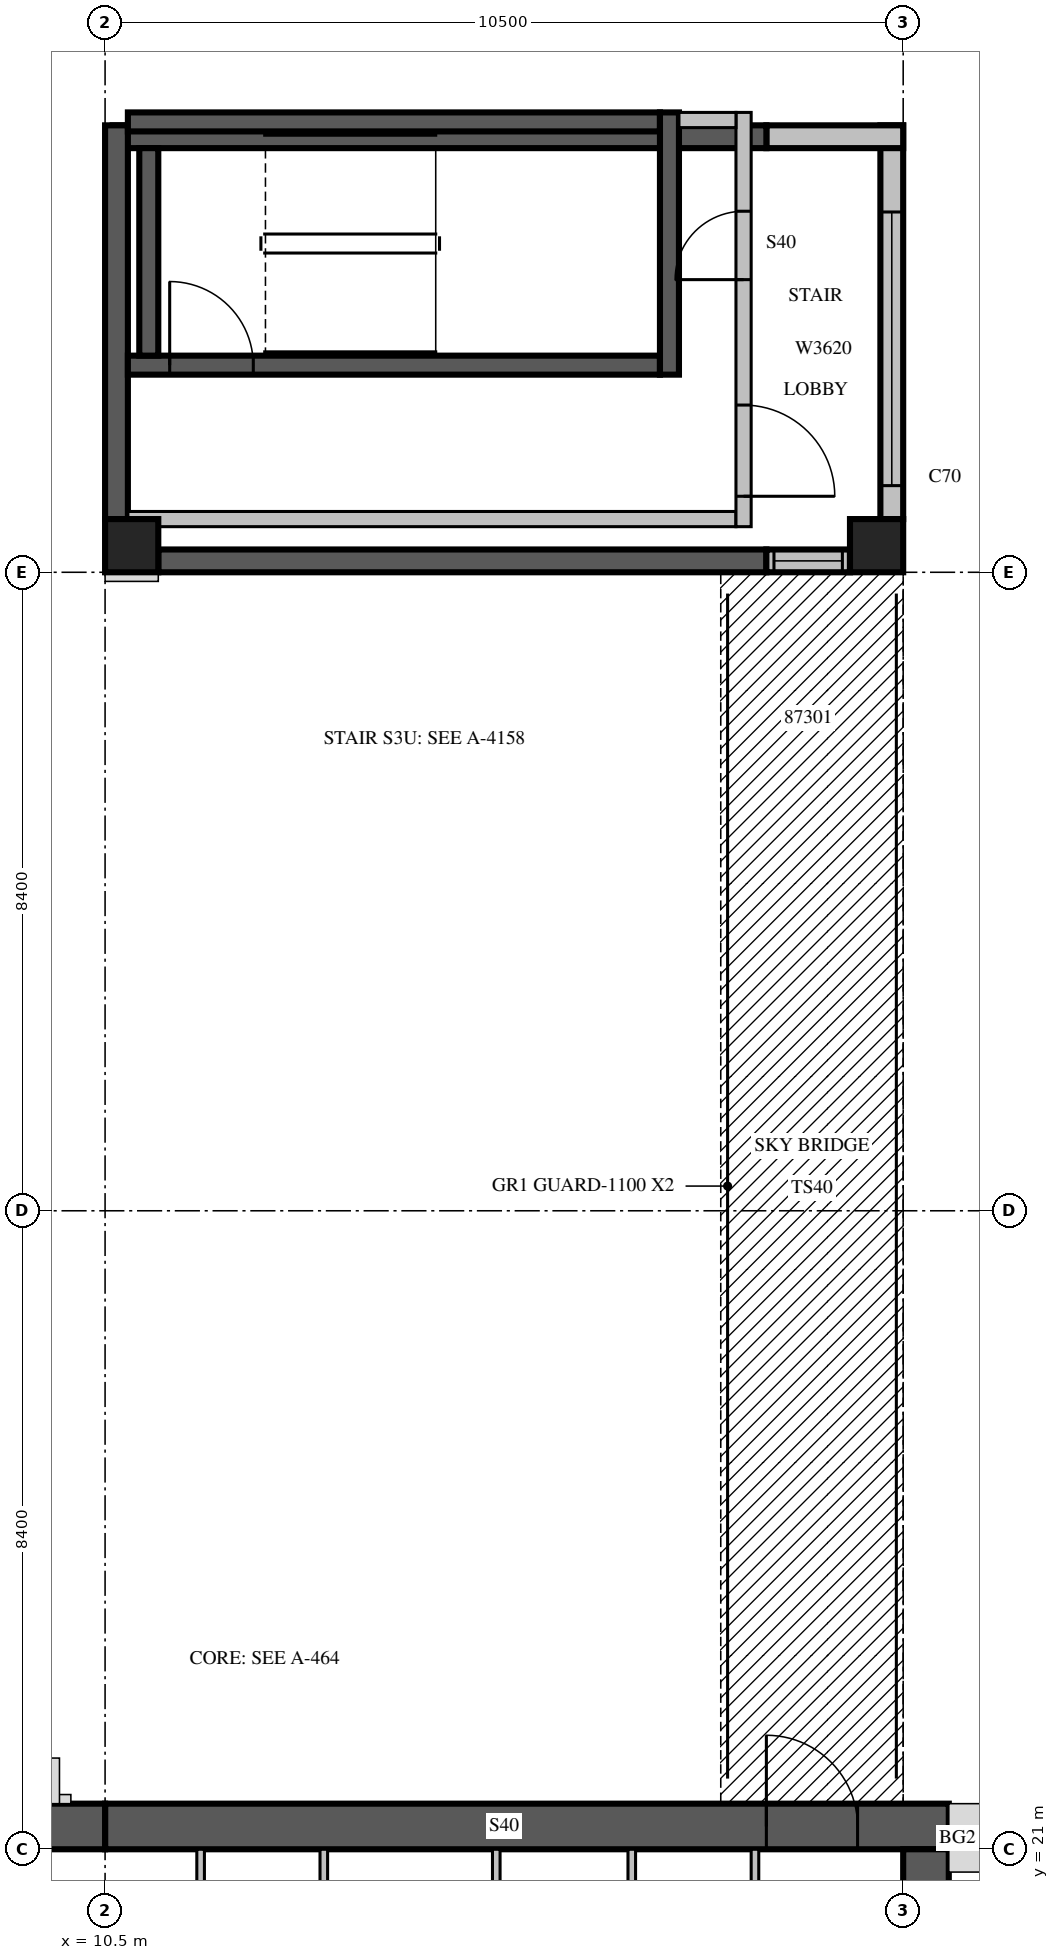
"""IFC4 building model, lengths in metres.
Left out: names, types, materials, properties, quantities, classifications, styles, units other than length and angle.
Written with IfcOpenShell. Run it as: python <this file> out.ifc"""

import sys

from ifc_helpers import new_model, si_unit, direction, frame, frame_2d, origin, origin_2d, place, context, subcontext, project, spatial, rectangle, extrude, source, transform, mapped, element, fill, save


model = new_model("IFC4")
c1 = context("Model", 3, precision=1e-05, world=origin(), true_north=direction((0.0, 1.0)))
c2 = subcontext(c1, "Body", "Model", "MODEL_VIEW")
j1 = project(units=[si_unit("LENGTHUNIT", "METRE"), si_unit("PLANEANGLEUNIT", "RADIAN")], contexts=[c1])
p1 = place(None, origin())
s1 = spatial("IfcSite", under=j1, at=p1, CompositionType="ELEMENT")
p2 = place(p1, origin())
s2 = spatial("IfcBuilding", under=s1, at=p2, CompositionType="ELEMENT")
p3 = place(p2, frame((0.0, 0.0, 316.0)))
s3 = spatial("IfcBuildingStorey", under=s2, at=p3, CompositionType="ELEMENT", Elevation=316.0)
m1 = source(origin(), c2, "Body", "SweptSolid", [
    extrude(rectangle(XDim=0.7, YDim=0.7, at=origin_2d()), origin(), (0.0, 0.0, 1.0), 3.5),
])
for number, where, z_axis, x_axis in (
    (1, (10.85, 38.15, 0.0), (0.0, 0.0, 1.0), (1.0, 0.0, 0.0)),
    (2, (20.65, 38.15, 0.0), (0.0, 0.0, 1.0), (1.0, 0.0, 0.0)),
):
    element("IfcColumn", number, at=place(p3, frame(where, z_axis=z_axis, x_axis=x_axis)), inside=s3, PredefinedType="COLUMN", context=c2, shape_type="MappedRepresentation", body=[
        mapped(m1, transform((0.0, 0.0, 0.0), scale=1.0)),
    ])
m2 = source(origin(), c2, "Body", "SweptSolid", [
    extrude(rectangle(XDim=11.1, YDim=0.6, at=frame_2d((5.55, 0.0))), origin(), (0.0, 0.0, 1.0), 3.5),
])
p4 = place(p3, frame((10.5, 21.3, 0.0), z_axis=(0.0, 0.0, 1.0), x_axis=(1.0, 0.0, 0.0)))
e3 = element("IfcWall", 3, at=p4, inside=s3, PredefinedType="SHEAR", context=c2, shape_type="MappedRepresentation", body=[
    mapped(m2, transform((0.0, 0.0, 0.0), scale=1.0)),
])
m3 = source(origin(), c2, "Body", "SweptSolid", [
    extrude(rectangle(XDim=1.2, YDim=2.1, at=frame_2d((0.6, 1.05))), frame((0.0, 0.31, 0.0), z_axis=(0.0, -1.0, 0.0), x_axis=(1.0, 0.0, 0.0)), (0.0, 0.0, 1.0), 0.62),
])
p5 = place(p4, frame((8.7, 0.0, 0.0)))
e4 = element("IfcOpeningElement", 4, at=p5, cuts=e3, PredefinedType="OPENING", context=c2, shape_type="MappedRepresentation", body=[
    mapped(m3, transform((0.0, 0.0, 0.0), scale=1.0)),
])
m4 = source(origin(), c2, "Body", "SweptSolid", [
    extrude(rectangle(XDim=10.5, YDim=0.6, at=frame_2d((5.25, 0.0))), origin(), (0.0, 0.0, 1.0), 3.5),
])
p6 = place(p3, frame((21.3, 10.5, 0.0), z_axis=(0.0, 0.0, 1.0), x_axis=(0.0, 1.0, 0.0)))
e5 = element("IfcWall", 5, at=p6, inside=s3, PredefinedType="SHEAR", context=c2, shape_type="MappedRepresentation", body=[
    mapped(m4, transform((0.0, 0.0, 0.0), scale=1.0)),
])
m5 = source(origin(), c2, "Body", "SweptSolid", [
    extrude(rectangle(XDim=1.2, YDim=2.4, at=frame_2d((0.6, 1.2))), frame((0.0, 0.31, 0.0), z_axis=(0.0, -1.0, 0.0), x_axis=(1.0, 0.0, 0.0)), (0.0, 0.0, 1.0), 0.62),
])
p7 = place(p6, frame((5.7, 0.0, 0.6)))
e6 = element("IfcOpeningElement", 6, at=p7, cuts=e5, PredefinedType="OPENING", context=c2, shape_type="MappedRepresentation", body=[
    mapped(m5, transform((0.0, 0.0, 0.0), scale=1.0)),
])
m6 = source(origin(), c2, "Body", "SweptSolid", [
    extrude(rectangle(XDim=6.6, YDim=0.6, at=frame_2d((3.3, 0.0))), origin(), (0.0, 0.0, 1.0), 3.5),
])
p8 = place(p3, frame((3.9, 21.3, 0.0), z_axis=(0.0, 0.0, 1.0), x_axis=(1.0, 0.0, 0.0)))
e7 = element("IfcWall", 7, at=p8, inside=s3, PredefinedType="SHEAR", context=c2, shape_type="MappedRepresentation", body=[
    mapped(m6, transform((0.0, 0.0, 0.0), scale=1.0)),
])
p9 = place(p8, frame((1.5, 0.0, 0.6)))
e8 = element("IfcOpeningElement", 8, at=p9, cuts=e7, PredefinedType="OPENING", context=c2, shape_type="MappedRepresentation", body=[
    mapped(m5, transform((0.0, 0.0, 0.0), scale=1.0)),
])
p10 = place(p8, frame((3.6, 0.0, 0.6)))
e9 = element("IfcOpeningElement", 9, at=p10, cuts=e7, PredefinedType="OPENING", context=c2, shape_type="MappedRepresentation", body=[
    mapped(m5, transform((0.0, 0.0, 0.0), scale=1.0)),
])
m7 = source(origin(), c2, "Body", "SweptSolid", [
    extrude(rectangle(XDim=8.0, YDim=0.3, at=frame_2d((4.0, 0.0))), origin(), (0.0, 0.0, 1.0), 3.1),
])
p11 = place(p3, frame((11.2, 37.95, 0.0), z_axis=(0.0, 0.0, 1.0), x_axis=(1.0, 0.0, 0.0)))
e10 = element("IfcWall", 10, at=p11, inside=s3, PredefinedType="SOLIDWALL", context=c2, shape_type="MappedRepresentation", body=[
    mapped(m7, transform((0.0, 0.0, 0.0), scale=1.0)),
])
m8 = source(origin(), c2, "Body", "SweptSolid", [
    extrude(rectangle(XDim=1.1, YDim=0.3, at=frame_2d((0.55, 0.0))), origin(), (0.0, 0.0, 1.0), 3.1),
])
p12 = place(p3, frame((19.2, 37.95, 0.0), z_axis=(0.0, 0.0, 1.0), x_axis=(1.0, 0.0, 0.0)))
e11 = element("IfcWall", 11, at=p12, inside=s3, PredefinedType="STANDARD", context=c2, shape_type="MappedRepresentation", body=[
    mapped(m8, transform((0.0, 0.0, 0.0), scale=1.0)),
])
p13 = place(p12, frame((0.1, 0.0, 0.0)))
e12 = element("IfcOpeningElement", 12, at=p13, cuts=e11, PredefinedType="OPENING", context=c2, shape_type="SweptSolid", body=[
    extrude(rectangle(XDim=0.9, YDim=2.1, at=frame_2d((0.45, 1.05))), frame((0.0, 0.16, 0.0), z_axis=(0.0, -1.0, 0.0), x_axis=(1.0, 0.0, 0.0)), (0.0, 0.0, 1.0), 0.32),
])
m9 = source(origin(), c2, "Body", "SweptSolid", [
    extrude(rectangle(XDim=5.18, YDim=0.3, at=frame_2d((2.59, 0.0))), origin(), (0.0, 0.0, 1.0), 3.1),
])
p14 = place(p3, frame((20.85, 38.5, 0.0), z_axis=(0.0, 0.0, 1.0), x_axis=(0.0, 1.0, 0.0)))
e13 = element("IfcWall", 13, at=p14, inside=s3, PredefinedType="STANDARD", context=c2, shape_type="MappedRepresentation", body=[
    mapped(m9, transform((0.0, 0.0, 0.0), scale=1.0)),
])
m10 = source(origin(), c2, "Body", "SweptSolid", [
    extrude(rectangle(XDim=3.6, YDim=2.0, at=frame_2d((1.8, 1.0))), frame((0.0, 0.16, 0.0), z_axis=(0.0, -1.0, 0.0), x_axis=(1.0, 0.0, 0.0)), (0.0, 0.0, 1.0), 0.32),
])
p15 = place(p14, frame((0.44, 0.0, 0.6)))
e14 = element("IfcOpeningElement", 14, at=p15, cuts=e13, PredefinedType="OPENING", context=c2, shape_type="MappedRepresentation", body=[
    mapped(m10, transform((0.0, 0.0, 0.0), scale=1.0)),
])
m11 = source(origin(), c2, "Body", "SweptSolid", [
    extrude(rectangle(XDim=1.8, YDim=0.3, at=frame_2d((0.9, 0.0))), origin(), (0.0, 0.0, 1.0), 3.1),
])
p16 = place(p3, frame((21.0, 43.53, 0.0), z_axis=(0.0, 0.0, 1.0), x_axis=(-1.0, 0.0, 0.0)))
e15 = element("IfcWall", 15, at=p16, inside=s3, PredefinedType="STANDARD", context=c2, shape_type="MappedRepresentation", body=[
    mapped(m11, transform((0.0, 0.0, 0.0), scale=1.0)),
])
m12 = source(origin(), c2, "Body", "SweptSolid", [
    extrude(rectangle(XDim=8.6, YDim=0.3, at=frame_2d((4.3, 0.0))), origin(), (0.0, 0.0, 1.0), 3.1),
])
p17 = place(p3, frame((19.2, 43.53, 0.0), z_axis=(0.0, 0.0, 1.0), x_axis=(-1.0, 0.0, 0.0)))
e16 = element("IfcWall", 16, at=p17, inside=s3, PredefinedType="SOLIDWALL", context=c2, shape_type="MappedRepresentation", body=[
    mapped(m12, transform((0.0, 0.0, 0.0), scale=1.0)),
])
m13 = source(origin(), c2, "Body", "SweptSolid", [
    extrude(rectangle(XDim=5.18, YDim=0.3, at=frame_2d((2.59, 0.0))), origin(), (0.0, 0.0, 1.0), 3.1),
])
p18 = place(p3, frame((10.65, 43.68, 0.0), z_axis=(0.0, 0.0, 1.0), x_axis=(0.0, -1.0, 0.0)))
e17 = element("IfcWall", 17, at=p18, inside=s3, PredefinedType="SOLIDWALL", context=c2, shape_type="MappedRepresentation", body=[
    mapped(m13, transform((0.0, 0.0, 0.0), scale=1.0)),
])
m14 = source(origin(), c2, "Body", "SweptSolid", [
    extrude(rectangle(XDim=1.3, YDim=0.1, at=frame_2d((0.65, 0.0))), origin(), (0.0, 0.0, 1.0), 3.1),
])
for number, where, z_axis, x_axis in (
    (18, (11.757, 19.7, 0.0), (0.0, 0.0, 1.0), (0.0, 1.0, 0.0)),
    (19, (13.378, 19.7, 0.0), (0.0, 0.0, 1.0), (0.0, 1.0, 0.0)),
    (20, (15.647, 19.7, 0.0), (0.0, 0.0, 1.0), (0.0, 1.0, 0.0)),
    (21, (17.429, 19.7, 0.0), (0.0, 0.0, 1.0), (0.0, 1.0, 0.0)),
    (22, (19.05, 19.7, 0.0), (0.0, 0.0, 1.0), (0.0, 1.0, 0.0)),
):
    element("IfcWall", number, at=place(p3, frame(where, z_axis=z_axis, x_axis=x_axis)), inside=s3, PredefinedType="PARTITIONING", context=c2, shape_type="MappedRepresentation", body=[
        mapped(m14, transform((0.0, 0.0, 0.0), scale=1.0)),
    ])
m15 = source(origin(), c2, "Body", "SweptSolid", [
    extrude(rectangle(XDim=7.0, YDim=0.25, at=frame_2d((3.5, 0.0))), origin(), (0.0, 0.0, 1.0), 3.1),
])
p19 = place(p3, frame((10.8, 40.525, 0.0), z_axis=(0.0, 0.0, 1.0), x_axis=(1.0, 0.0, 0.0)))
e23 = element("IfcWall", 23, at=p19, inside=s3, PredefinedType="SOLIDWALL", context=c2, shape_type="MappedRepresentation", body=[
    mapped(m15, transform((0.0, 0.0, 0.0), scale=1.0)),
])
m16 = source(origin(), c2, "Body", "SweptSolid", [
    extrude(rectangle(XDim=1.1, YDim=2.1, at=frame_2d((0.55, 1.05))), frame((0.0, 0.135, 0.0), z_axis=(0.0, -1.0, 0.0), x_axis=(1.0, 0.0, 0.0)), (0.0, 0.0, 1.0), 0.27),
])
p20 = place(p19, frame((0.55, 0.0, 0.0)))
e24 = element("IfcOpeningElement", 24, at=p20, cuts=e23, PredefinedType="OPENING", context=c2, shape_type="MappedRepresentation", body=[
    mapped(m16, transform((0.0, 0.0, 0.0), scale=1.0)),
])
p21 = place(p3, frame((10.8, 43.725, 0.0), z_axis=(0.0, 0.0, 1.0), x_axis=(1.0, 0.0, 0.0)))
e25 = element("IfcWall", 25, at=p21, inside=s3, PredefinedType="SOLIDWALL", context=c2, shape_type="MappedRepresentation", body=[
    mapped(m15, transform((0.0, 0.0, 0.0), scale=1.0)),
])
m17 = source(origin(), c2, "Body", "SweptSolid", [
    extrude(rectangle(XDim=3.45, YDim=0.25, at=frame_2d((1.725, 0.0))), origin(), (0.0, 0.0, 1.0), 3.1),
])
p22 = place(p3, frame((17.925, 40.4, 0.0), z_axis=(0.0, 0.0, 1.0), x_axis=(0.0, 1.0, 0.0)))
e26 = element("IfcWall", 26, at=p22, inside=s3, PredefinedType="SOLIDWALL", context=c2, shape_type="MappedRepresentation", body=[
    mapped(m17, transform((0.0, 0.0, 0.0), scale=1.0)),
])
m18 = source(origin(), c2, "Body", "SweptSolid", [
    extrude(rectangle(XDim=2.73, YDim=0.25, at=frame_2d((1.365, 0.0))), origin(), (0.0, 0.0, 1.0), 3.1),
])
p23 = place(p3, frame((11.075, 40.65, 0.0), z_axis=(0.0, 0.0, 1.0), x_axis=(0.0, 1.0, 0.0)))
e27 = element("IfcWall", 27, at=p23, inside=s3, PredefinedType="SOLIDWALL", context=c2, shape_type="MappedRepresentation", body=[
    mapped(m18, transform((0.0, 0.0, 0.0), scale=1.0)),
])
m19 = source(origin(), c2, "Body", "SweptSolid", [
    extrude(rectangle(XDim=8.0, YDim=0.2, at=frame_2d((4.0, 0.0))), origin(), (0.0, 0.0, 1.0), 3.1),
])
p24 = place(p3, frame((10.8, 38.5, 0.0), z_axis=(0.0, 0.0, 1.0), x_axis=(1.0, 0.0, 0.0)))
e28 = element("IfcWall", 28, at=p24, inside=s3, PredefinedType="PARTITIONING", context=c2, shape_type="MappedRepresentation", body=[
    mapped(m19, transform((0.0, 0.0, 0.0), scale=1.0)),
])
m20 = source(origin(), c2, "Body", "SweptSolid", [
    extrude(rectangle(XDim=5.45, YDim=0.2, at=frame_2d((2.725, 0.0))), origin(), (0.0, 0.0, 1.0), 3.1),
])
p25 = place(p3, frame((18.9, 38.4, 0.0), z_axis=(0.0, 0.0, 1.0), x_axis=(0.0, 1.0, 0.0)))
e29 = element("IfcWall", 29, at=p25, inside=s3, PredefinedType="PARTITIONING", context=c2, shape_type="MappedRepresentation", body=[
    mapped(m20, transform((0.0, 0.0, 0.0), scale=1.0)),
])
m21 = source(origin(), c2, "Body", "SweptSolid", [
    extrude(rectangle(XDim=1.2, YDim=2.1, at=frame_2d((0.6, 1.05))), frame((0.0, 0.11, 0.0), z_axis=(0.0, -1.0, 0.0), x_axis=(1.0, 0.0, 0.0)), (0.0, 0.0, 1.0), 0.22),
])
p26 = place(p25, frame((0.4, 0.0, 0.0)))
e30 = element("IfcOpeningElement", 30, at=p26, cuts=e29, PredefinedType="OPENING", context=c2, shape_type="MappedRepresentation", body=[
    mapped(m21, transform((0.0, 0.0, 0.0), scale=1.0)),
])
m22 = source(origin(), c2, "Body", "SweptSolid", [
    extrude(rectangle(XDim=0.9, YDim=2.1, at=frame_2d((0.45, 1.05))), frame((0.0, 0.11, 0.0), z_axis=(0.0, -1.0, 0.0), x_axis=(1.0, 0.0, 0.0)), (0.0, 0.0, 1.0), 0.22),
])
p27 = place(p25, frame((3.25, 0.0, 0.0)))
e31 = element("IfcOpeningElement", 31, at=p27, cuts=e29, PredefinedType="OPENING", context=c2, shape_type="MappedRepresentation", body=[
    mapped(m22, transform((0.0, 0.0, 0.0), scale=1.0)),
])
m23 = source(origin(), c2, "Body", "SweptSolid", [
    extrude(rectangle(XDim=0.75, YDim=0.2, at=frame_2d((0.375, 0.0))), origin(), (0.0, 0.0, 1.0), 3.1),
])
p28 = place(p3, frame((18.05, 43.75, 0.0), z_axis=(0.0, 0.0, 1.0), x_axis=(1.0, 0.0, 0.0)))
e32 = element("IfcWall", 32, at=p28, inside=s3, PredefinedType="PARTITIONING", context=c2, shape_type="MappedRepresentation", body=[
    mapped(m23, transform((0.0, 0.0, 0.0), scale=1.0)),
])
m24 = source(origin(), c2, "Body", "SweptSolid", [
    extrude(rectangle(XDim=3.6, YDim=2.0, at=frame_2d((1.8, 1.0))), frame((0.0, 0.03, 0.0), z_axis=(0.0, -1.0, 0.0), x_axis=(1.0, 0.0, 0.0)), (0.0, 0.0, 1.0), 0.06),
])
p29 = place(p15, origin())
e33 = element("IfcWindow", 33, at=p29, inside=s3, PartitioningType="SINGLE_PANEL", PredefinedType="WINDOW", context=c2, shape_type="MappedRepresentation", body=[
    mapped(m24, transform((0.0, 0.0, 0.0), scale=1.0)),
])
fill(e14, e33)
p30 = place(p13, origin())
e34 = element("IfcDoor", 34, at=p30, inside=s3, OperationType="SLIDING_TO_LEFT", PredefinedType="DOOR", context=c2, shape_type="SweptSolid", body=[
    extrude(rectangle(XDim=0.9, YDim=2.1, at=frame_2d((0.45, 1.05))), frame((0.0, 0.025, 0.0), z_axis=(0.0, -1.0, 0.0), x_axis=(1.0, 0.0, 0.0)), (0.0, 0.0, 1.0), 0.05),
])
fill(e12, e34)
m25 = source(origin(), c2, "Body", "SweptSolid", [
    extrude(rectangle(XDim=1.1, YDim=2.1, at=frame_2d((0.55, 1.05))), frame((0.0, 0.025, 0.0), z_axis=(0.0, -1.0, 0.0), x_axis=(1.0, 0.0, 0.0)), (0.0, 0.0, 1.0), 0.05),
])
p31 = place(p20, origin())
e35 = element("IfcDoor", 35, at=p31, inside=s3, OperationType="SINGLE_SWING_LEFT", PredefinedType="DOOR", context=c2, shape_type="MappedRepresentation", body=[
    mapped(m25, transform((0.0, 0.0, 0.0), scale=1.0)),
])
fill(e24, e35)
m26 = source(origin(), c2, "Body", "SweptSolid", [
    extrude(rectangle(XDim=1.2, YDim=2.1, at=frame_2d((0.6, 1.05))), frame((0.0, 0.025, 0.0), z_axis=(0.0, -1.0, 0.0), x_axis=(1.0, 0.0, 0.0)), (0.0, 0.0, 1.0), 0.05),
])
p32 = place(p26, origin())
e36 = element("IfcDoor", 36, at=p32, inside=s3, OperationType="SINGLE_SWING_RIGHT", PredefinedType="DOOR", context=c2, shape_type="MappedRepresentation", body=[
    mapped(m26, transform((0.0, 0.0, 0.0), scale=1.0)),
])
fill(e30, e36)
m27 = source(origin(), c2, "Body", "SweptSolid", [
    extrude(rectangle(XDim=0.9, YDim=2.1, at=frame_2d((0.45, 1.05))), frame((0.0, 0.025, 0.0), z_axis=(0.0, -1.0, 0.0), x_axis=(1.0, 0.0, 0.0)), (0.0, 0.0, 1.0), 0.05),
])
p33 = place(p27, origin())
e37 = element("IfcDoor", 37, at=p33, inside=s3, OperationType="SINGLE_SWING_LEFT", PredefinedType="DOOR", context=c2, shape_type="MappedRepresentation", body=[
    mapped(m27, transform((0.0, 0.0, 0.0), scale=1.0)),
])
fill(e31, e37)
p34 = place(p5, origin())
e38 = element("IfcDoor", 38, at=p34, inside=s3, OperationType="SINGLE_SWING_LEFT", PredefinedType="DOOR", context=c2, shape_type="MappedRepresentation", body=[
    mapped(m26, transform((0.0, 0.0, 0.0), scale=1.0)),
])
fill(e4, e38)
save(model, sys.argv[1])
